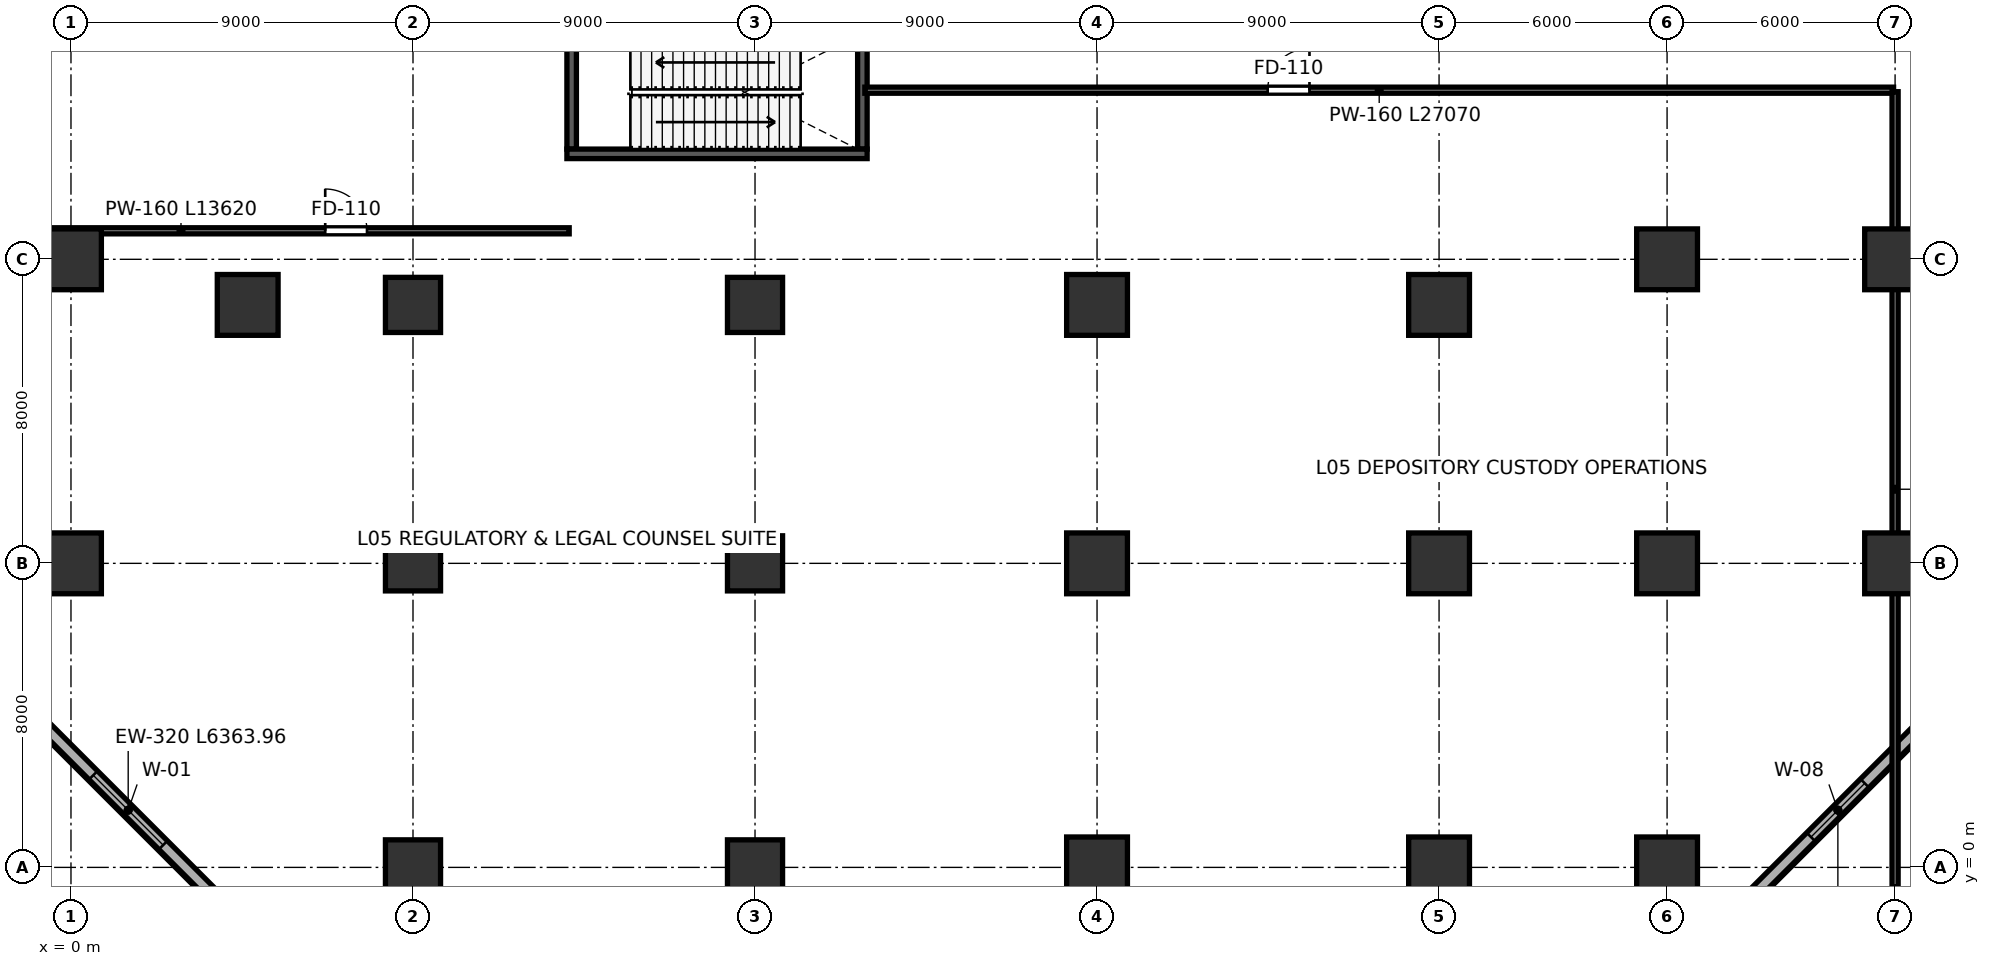
"""IFC4 building model, lengths in metres.
Left out: names, types, materials, properties, quantities, classifications, styles, units other than length and angle.
Written with IfcOpenShell. Run it as: python <this file> out.ifc"""

import sys

from ifc_helpers import new_model, si_unit, direction, frame, frame_2d, origin, origin_2d, place, context, subcontext, project, spatial, rectangle, extrude, source, transform, mapped, element, fill, save


model = new_model("IFC4")
c1 = context("Model", 3, precision=1e-05, world=origin(), true_north=direction((0.0, 1.0)))
c2 = subcontext(c1, "Body", "Model", "MODEL_VIEW")
j1 = project(units=[si_unit("LENGTHUNIT", "METRE"), si_unit("PLANEANGLEUNIT", "RADIAN")], contexts=[c1])
p1 = place(None, origin())
s1 = spatial("IfcSite", under=j1, at=p1, CompositionType="ELEMENT")
p2 = place(p1, origin())
s2 = spatial("IfcBuilding", under=s1, at=p2, CompositionType="ELEMENT")
p3 = place(p2, frame((0.0, 0.0, 22.2)))
s3 = spatial("IfcBuildingStorey", under=s2, at=p3, CompositionType="ELEMENT", Elevation=22.2)
m1 = source(origin(), c2, "Body", "SweptSolid", [
    extrude(rectangle(XDim=1.6, YDim=1.6, at=origin_2d()), origin(), (0.0, 0.0, 1.0), 5.799),
])
for number, where, z_axis, x_axis in (
    (1, (0.0, 8.0, 0.001), (0.0, 0.0, 1.0), (1.0, 0.0, 0.0)),
    (2, (0.0, 16.0, 0.001), (0.0, 0.0, 1.0), (1.0, 0.0, 0.0)),
):
    element("IfcColumn", number, at=place(p3, frame(where, z_axis=z_axis, x_axis=x_axis)), inside=s3, PredefinedType="COLUMN", context=c2, shape_type="MappedRepresentation", body=[
        mapped(m1, transform((0.0, 0.0, 0.0), scale=1.0)),
    ])
m2 = source(origin(), c2, "Body", "SweptSolid", [
    extrude(rectangle(XDim=1.45, YDim=1.45, at=origin_2d()), origin(), (0.0, 0.0, 1.0), 5.799),
])
p4 = place(p3, frame((9.0, 0.0, 0.001), z_axis=(0.0, 0.0, 1.0), x_axis=(1.0, 0.0, 0.0)))
e3 = element("IfcColumn", 3, at=p4, inside=s3, PredefinedType="COLUMN", context=c2, shape_type="MappedRepresentation", body=[
    mapped(m2, transform((0.0, 0.0, 0.0), scale=1.0)),
])
m3 = source(origin(), c2, "Body", "SweptSolid", [
    extrude(rectangle(XDim=1.45, YDim=1.45, at=origin_2d()), origin(), (0.0, 0.0, 1.0), 5.799),
])
for number, where, z_axis, x_axis in (
    (4, (9.0, 8.0, 0.001), (0.0, 0.0, 1.0), (1.0, 0.0, 0.0)),
    (5, (9.0, 14.8, 0.001), (0.0, 0.0, 1.0), (1.0, 0.0, 0.0)),
):
    element("IfcColumn", number, at=place(p3, frame(where, z_axis=z_axis, x_axis=x_axis)), inside=s3, PredefinedType="COLUMN", context=c2, shape_type="MappedRepresentation", body=[
        mapped(m3, transform((0.0, 0.0, 0.0), scale=1.0)),
    ])
p5 = place(p3, frame((18.0, 0.0, 0.001), z_axis=(0.0, 0.0, 1.0), x_axis=(1.0, 0.0, 0.0)))
e6 = element("IfcColumn", 6, at=p5, inside=s3, PredefinedType="COLUMN", context=c2, shape_type="MappedRepresentation", body=[
    mapped(m2, transform((0.0, 0.0, 0.0), scale=1.0)),
])
for number, where, z_axis, x_axis in (
    (7, (18.0, 8.0, 0.001), (0.0, 0.0, 1.0), (1.0, 0.0, 0.0)),
    (8, (18.0, 14.8, 0.001), (0.0, 0.0, 1.0), (1.0, 0.0, 0.0)),
):
    element("IfcColumn", number, at=place(p3, frame(where, z_axis=z_axis, x_axis=x_axis)), inside=s3, PredefinedType="COLUMN", context=c2, shape_type="MappedRepresentation", body=[
        mapped(m3, transform((0.0, 0.0, 0.0), scale=1.0)),
    ])
p6 = place(p3, frame((27.0, 0.0, 0.001), z_axis=(0.0, 0.0, 1.0), x_axis=(1.0, 0.0, 0.0)))
e9 = element("IfcColumn", 9, at=p6, inside=s3, PredefinedType="COLUMN", context=c2, shape_type="MappedRepresentation", body=[
    mapped(m1, transform((0.0, 0.0, 0.0), scale=1.0)),
])
m4 = source(origin(), c2, "Body", "SweptSolid", [
    extrude(rectangle(XDim=1.6, YDim=1.6, at=origin_2d()), origin(), (0.0, 0.0, 1.0), 5.799),
])
for number, where, z_axis, x_axis in (
    (10, (27.0, 8.0, 0.001), (0.0, 0.0, 1.0), (1.0, 0.0, 0.0)),
    (11, (27.0, 14.8, 0.001), (0.0, 0.0, 1.0), (1.0, 0.0, 0.0)),
):
    element("IfcColumn", number, at=place(p3, frame(where, z_axis=z_axis, x_axis=x_axis)), inside=s3, PredefinedType="COLUMN", context=c2, shape_type="MappedRepresentation", body=[
        mapped(m4, transform((0.0, 0.0, 0.0), scale=1.0)),
    ])
p7 = place(p3, frame((36.0, 0.0, 0.001), z_axis=(0.0, 0.0, 1.0), x_axis=(1.0, 0.0, 0.0)))
e12 = element("IfcColumn", 12, at=p7, inside=s3, PredefinedType="COLUMN", context=c2, shape_type="MappedRepresentation", body=[
    mapped(m1, transform((0.0, 0.0, 0.0), scale=1.0)),
])
for number, where, z_axis, x_axis in (
    (13, (36.0, 8.0, 0.001), (0.0, 0.0, 1.0), (1.0, 0.0, 0.0)),
    (14, (36.0, 14.8, 0.001), (0.0, 0.0, 1.0), (1.0, 0.0, 0.0)),
):
    element("IfcColumn", number, at=place(p3, frame(where, z_axis=z_axis, x_axis=x_axis)), inside=s3, PredefinedType="COLUMN", context=c2, shape_type="MappedRepresentation", body=[
        mapped(m4, transform((0.0, 0.0, 0.0), scale=1.0)),
    ])
p8 = place(p3, frame((42.0, 0.0, 0.001), z_axis=(0.0, 0.0, 1.0), x_axis=(1.0, 0.0, 0.0)))
e15 = element("IfcColumn", 15, at=p8, inside=s3, PredefinedType="COLUMN", context=c2, shape_type="MappedRepresentation", body=[
    mapped(m1, transform((0.0, 0.0, 0.0), scale=1.0)),
])
for number, where, z_axis, x_axis in (
    (16, (42.0, 8.0, 0.001), (0.0, 0.0, 1.0), (1.0, 0.0, 0.0)),
    (17, (42.0, 16.0, 0.001), (0.0, 0.0, 1.0), (1.0, 0.0, 0.0)),
):
    element("IfcColumn", number, at=place(p3, frame(where, z_axis=z_axis, x_axis=x_axis)), inside=s3, PredefinedType="COLUMN", context=c2, shape_type="MappedRepresentation", body=[
        mapped(m4, transform((0.0, 0.0, 0.0), scale=1.0)),
    ])
for number, where, z_axis, x_axis in (
    (18, (48.0, 8.0, 0.001), (0.0, 0.0, 1.0), (1.0, 0.0, 0.0)),
    (19, (48.0, 16.0, 0.001), (0.0, 0.0, 1.0), (1.0, 0.0, 0.0)),
):
    element("IfcColumn", number, at=place(p3, frame(where, z_axis=z_axis, x_axis=x_axis)), inside=s3, PredefinedType="COLUMN", context=c2, shape_type="MappedRepresentation", body=[
        mapped(m1, transform((0.0, 0.0, 0.0), scale=1.0)),
    ])
p9 = place(p3, frame((4.65, 14.8, 0.001), z_axis=(0.0, 0.0, 1.0), x_axis=(1.0, 0.0, 0.0)))
e20 = element("IfcColumn", 20, at=p9, inside=s3, PredefinedType="COLUMN", context=c2, shape_type="MappedRepresentation", body=[
    mapped(m4, transform((0.0, 0.0, 0.0), scale=1.0)),
])
p10 = place(p3, frame((44.244, -0.744, 0.0), z_axis=(0.0, 0.0, 1.0), x_axis=(0.707106781187, 0.707106781187, 0.0)))
e21 = element("IfcWall", 21, at=p10, inside=s3, PredefinedType="SOLIDWALL", context=c2, shape_type="SweptSolid", body=[
    extrude(rectangle(XDim=6.364, YDim=0.32, at=frame_2d((3.182, 0.0))), origin(), (0.0, 0.0, 1.0), 5.52),
])
p11 = place(p10, frame((2.182, 0.0, 0.65)))
e22 = element("IfcOpeningElement", 22, at=p11, cuts=e21, PredefinedType="OPENING", context=c2, shape_type="SweptSolid", body=[
    extrude(rectangle(XDim=2.0, YDim=2.25, at=frame_2d((1.0, 1.125))), frame((0.0, 0.17, 0.0), z_axis=(0.0, -1.0, 0.0), x_axis=(1.0, 0.0, 0.0)), (0.0, 0.0, 1.0), 0.34),
])
p12 = place(p3, frame((-0.744, 3.756, 0.0), z_axis=(0.0, 0.0, 1.0), x_axis=(0.707106781187, -0.707106781187, 0.0)))
e23 = element("IfcWall", 23, at=p12, inside=s3, PredefinedType="SOLIDWALL", context=c2, shape_type="SweptSolid", body=[
    extrude(rectangle(XDim=6.364, YDim=0.32, at=frame_2d((3.182, 0.0))), origin(), (0.0, 0.0, 1.0), 5.52),
])
p13 = place(p12, frame((1.882, 0.0, 0.65)))
e24 = element("IfcOpeningElement", 24, at=p13, cuts=e23, PredefinedType="OPENING", context=c2, shape_type="SweptSolid", body=[
    extrude(rectangle(XDim=2.6, YDim=2.35, at=frame_2d((1.3, 1.175))), frame((0.0, 0.17, 0.0), z_axis=(0.0, -1.0, 0.0), x_axis=(1.0, 0.0, 0.0)), (0.0, 0.0, 1.0), 0.34),
])
for number, where, z_axis, x_axis in (
    (25, (13.175, 18.9, 0.0), (0.0, 0.0, 1.0), (0.0, 1.0, 0.0)),
    (26, (20.825, 18.9, 0.0), (0.0, 0.0, 1.0), (0.0, 1.0, 0.0)),
):
    element("IfcWall", number, at=place(p3, frame(where, z_axis=z_axis, x_axis=x_axis)), inside=s3, PredefinedType="SHEAR", context=c2, shape_type="SweptSolid", body=[
        extrude(rectangle(XDim=2.99, YDim=0.25, at=frame_2d((1.495, 0.0))), origin(), (0.0, 0.0, 1.0), 5.52),
    ])
p14 = place(p3, frame((13.05, 18.775, 0.0), z_axis=(0.0, 0.0, 1.0), x_axis=(1.0, 0.0, 0.0)))
e27 = element("IfcWall", 27, at=p14, inside=s3, PredefinedType="SHEAR", context=c2, shape_type="SweptSolid", body=[
    extrude(rectangle(XDim=7.9, YDim=0.25, at=frame_2d((3.95, 0.0))), origin(), (0.0, 0.0, 1.0), 5.52),
])
p15 = place(p3, frame((-0.51, 16.75, 0.0), z_axis=(0.0, 0.0, 1.0), x_axis=(1.0, 0.0, 0.0)))
e28 = element("IfcWall", 28, at=p15, inside=s3, PredefinedType="PARTITIONING", context=c2, shape_type="SweptSolid", body=[
    extrude(rectangle(XDim=13.62, YDim=0.16, at=frame_2d((6.81, 0.0))), origin(), (0.0, 0.0, 1.0), 4.65),
])
p16 = place(p15, frame((7.2, 0.0, 0.0)))
e29 = element("IfcOpeningElement", 29, at=p16, cuts=e28, PredefinedType="OPENING", context=c2, shape_type="SweptSolid", body=[
    extrude(rectangle(XDim=1.1, YDim=2.2, at=frame_2d((0.55, 1.1))), frame((0.0, 0.09, 0.0), z_axis=(0.0, -1.0, 0.0), x_axis=(1.0, 0.0, 0.0)), (0.0, 0.0, 1.0), 0.18),
])
p17 = place(p3, frame((20.89, 20.45, 0.0), z_axis=(0.0, 0.0, 1.0), x_axis=(1.0, 0.0, 0.0)))
e30 = element("IfcWall", 30, at=p17, inside=s3, PredefinedType="PARTITIONING", context=c2, shape_type="SweptSolid", body=[
    extrude(rectangle(XDim=27.07, YDim=0.16, at=frame_2d((13.535, 0.0))), origin(), (0.0, 0.0, 1.0), 4.65),
])
p18 = place(p17, frame((10.6, 0.0, 0.0)))
e31 = element("IfcOpeningElement", 31, at=p18, cuts=e30, PredefinedType="OPENING", context=c2, shape_type="SweptSolid", body=[
    extrude(rectangle(XDim=1.1, YDim=2.2, at=frame_2d((0.55, 1.1))), frame((0.0, 0.09, 0.0), z_axis=(0.0, -1.0, 0.0), x_axis=(1.0, 0.0, 0.0)), (0.0, 0.0, 1.0), 0.18),
])
p19 = place(p3, frame((48.0, -0.51, 0.0), z_axis=(0.0, 0.0, 1.0), x_axis=(0.0, 1.0, 0.0)))
e32 = element("IfcWall", 32, at=p19, inside=s3, PredefinedType="PARTITIONING", context=c2, shape_type="SweptSolid", body=[
    extrude(rectangle(XDim=20.92, YDim=0.16, at=frame_2d((10.46, 0.0))), origin(), (0.0, 0.0, 1.0), 4.655),
])
m5 = source(origin(), c2, "Body", "SweptSolid", [
    extrude(rectangle(XDim=2.0, YDim=2.25, at=frame_2d((1.0, 1.125))), frame((0.0, 0.03, 0.0), z_axis=(0.0, -1.0, 0.0), x_axis=(1.0, 0.0, 0.0)), (0.0, 0.0, 1.0), 0.06),
])
p20 = place(p11, origin())
e33 = element("IfcWindow", 33, at=p20, inside=s3, PartitioningType="DOUBLE_PANEL_HORIZONTAL", PredefinedType="WINDOW", context=c2, shape_type="MappedRepresentation", body=[
    mapped(m5, transform((0.0, 0.0, 0.0), scale=1.0)),
])
fill(e22, e33)
m6 = source(origin(), c2, "Body", "SweptSolid", [
    extrude(rectangle(XDim=2.6, YDim=2.35, at=frame_2d((1.3, 1.175))), frame((0.0, 0.03, 0.0), z_axis=(0.0, -1.0, 0.0), x_axis=(1.0, 0.0, 0.0)), (0.0, 0.0, 1.0), 0.06),
])
p21 = place(p13, origin())
e34 = element("IfcWindow", 34, at=p21, inside=s3, PartitioningType="DOUBLE_PANEL_VERTICAL", PredefinedType="WINDOW", context=c2, shape_type="MappedRepresentation", body=[
    mapped(m6, transform((0.0, 0.0, 0.0), scale=1.0)),
])
fill(e24, e34)
m7 = source(origin(), c2, "Body", "SweptSolid", [
    extrude(rectangle(XDim=1.1, YDim=2.2, at=frame_2d((0.55, 1.1))), frame((0.0, 0.025, 0.0), z_axis=(0.0, -1.0, 0.0), x_axis=(1.0, 0.0, 0.0)), (0.0, 0.0, 1.0), 0.05),
])
p22 = place(p16, origin())
e35 = element("IfcDoor", 35, at=p22, inside=s3, OperationType="SINGLE_SWING_LEFT", PredefinedType="DOOR", context=c2, shape_type="MappedRepresentation", body=[
    mapped(m7, transform((0.0, 0.0, 0.0), scale=1.0)),
])
fill(e29, e35)
p23 = place(p18, origin())
e36 = element("IfcDoor", 36, at=p23, inside=s3, OperationType="SINGLE_SWING_RIGHT", PredefinedType="DOOR", context=c2, shape_type="MappedRepresentation", body=[
    mapped(m7, transform((0.0, 0.0, 0.0), scale=1.0)),
])
fill(e31, e36)
save(model, sys.argv[1])
